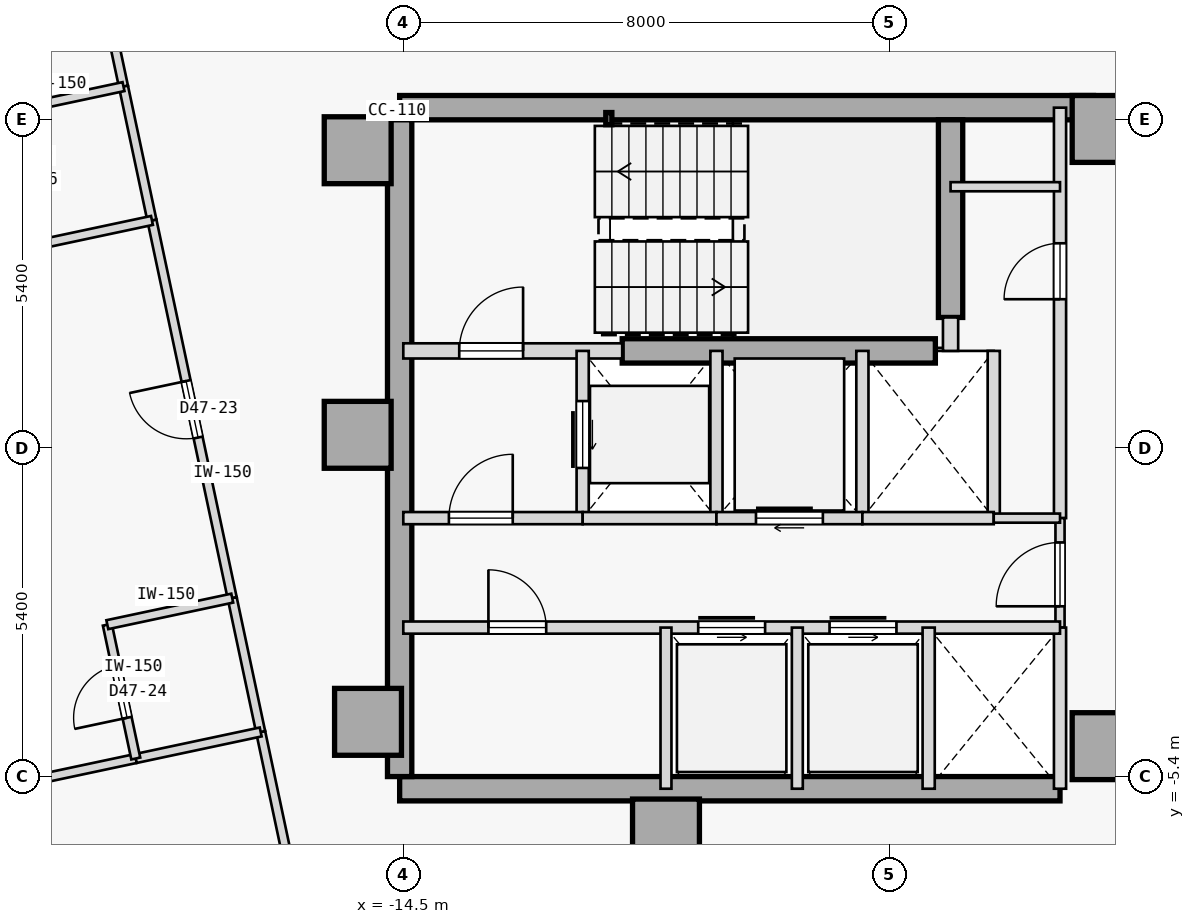
"""IFC4 building model, lengths in metres.
Left out: names, types, materials, properties, quantities, classifications, styles, units other than length and angle.
Written with IfcOpenShell. Run it as: python <this file> out.ifc"""

import sys

from ifc_helpers import new_model, si_unit, direction, frame, frame_2d, origin, origin_2d, place, context, subcontext, project, spatial, rectangle, hollow_rectangle, extrude, element, fill, save


model = new_model("IFC4")
c1 = context("Model", 3, precision=1e-05, world=origin(), true_north=direction((0.0, 1.0)))
c2 = subcontext(c1, "Body", "Model", "MODEL_VIEW")
j1 = project(units=[si_unit("LENGTHUNIT", "METRE"), si_unit("PLANEANGLEUNIT", "RADIAN")], contexts=[c1])
p1 = place(None, origin())
s1 = spatial("IfcSite", under=j1, at=p1, CompositionType="ELEMENT")
p2 = place(p1, origin())
s2 = spatial("IfcBuilding", under=s1, at=p2, CompositionType="ELEMENT")
p3 = place(p2, frame((0.0, 0.0, 182.0)))
s3 = spatial("IfcBuildingStorey", under=s2, at=p3, CompositionType="ELEMENT", Elevation=182.0)
for number, where, z_axis, x_axis in (
    (1, (-15.25, 4.9, 0.0), (0.0, 0.0, 1.0), (1.0, 0.0, 0.0)),
    (2, (-15.25, 0.22, 0.0), (0.0, 0.0, 1.0), (1.0, 0.0, 0.0)),
    (3, (-15.08, -4.5, 0.0), (0.0, 0.0, 1.0), (1.0, 0.0, 0.0)),
    (4, (-10.18, -6.32, 0.0), (0.0, 0.0, 1.0), (1.0, 0.0, 0.0)),
    (5, (-2.95, -4.9, 0.0), (0.0, 0.0, 1.0), (1.0, 0.0, 0.0)),
    (6, (-2.95, 5.25, 0.0), (0.0, 0.0, 1.0), (1.0, 0.0, 0.0)),
):
    element("IfcColumn", number, at=place(p3, frame(where, z_axis=z_axis, x_axis=x_axis)), inside=s3, PredefinedType="COLUMN", context=c2, shape_type="SweptSolid", body=[
        extrude(rectangle(XDim=1.1, YDim=1.1, at=origin_2d()), origin(), (0.0, 0.0, 1.0), 3.4),
    ])
p4 = place(p3, frame((-14.56, 5.6, 0.0), z_axis=(0.0, 0.0, 1.0), x_axis=(1.0, 0.0, 0.0)))
e7 = element("IfcWall", 7, at=p4, inside=s3, PredefinedType="SHEAR", context=c2, shape_type="SweptSolid", body=[
    extrude(rectangle(XDim=11.41, YDim=0.4, at=frame_2d((5.705, 0.0))), origin(), (0.0, 0.0, 1.0), 3.175),
])
p5 = place(p3, frame((-14.56, -5.6, 0.0), z_axis=(0.0, 0.0, 1.0), x_axis=(1.0, 0.0, 0.0)))
e8 = element("IfcWall", 8, at=p5, inside=s3, PredefinedType="SHEAR", context=c2, shape_type="SweptSolid", body=[
    extrude(rectangle(XDim=10.86, YDim=0.4, at=frame_2d((5.43, 0.0))), origin(), (0.0, 0.0, 1.0), 3.175),
])
p6 = place(p3, frame((-14.56, -5.4, 0.0), z_axis=(0.0, 0.0, 1.0), x_axis=(0.0, 1.0, 0.0)))
e9 = element("IfcWall", 9, at=p6, inside=s3, PredefinedType="SHEAR", context=c2, shape_type="SweptSolid", body=[
    extrude(rectangle(XDim=10.8, YDim=0.4, at=frame_2d((5.4, 0.0))), origin(), (0.0, 0.0, 1.0), 3.175),
])
p7 = place(p3, frame((-5.5, 2.15, 0.0), z_axis=(0.0, 0.0, 1.0), x_axis=(0.0, 1.0, 0.0)))
e10 = element("IfcWall", 10, at=p7, inside=s3, PredefinedType="SHEAR", context=c2, shape_type="SweptSolid", body=[
    extrude(rectangle(XDim=3.25, YDim=0.4, at=frame_2d((1.625, 0.0))), origin(), (0.0, 0.0, 1.0), 3.175),
])
p8 = place(p3, frame((-10.9, 1.6, 0.0), z_axis=(0.0, 0.0, 1.0), x_axis=(1.0, 0.0, 0.0)))
e11 = element("IfcWall", 11, at=p8, inside=s3, PredefinedType="SHEAR", context=c2, shape_type="SweptSolid", body=[
    extrude(rectangle(XDim=5.15, YDim=0.4, at=frame_2d((2.575, 0.0))), origin(), (0.0, 0.0, 1.0), 3.175),
])
p9 = place(p3, frame((-11.12, 5.42, 0.0), z_axis=(0.0, 0.0, 1.0), x_axis=(1.0, 0.0, 0.0)))
e12 = element("IfcColumn", 12, at=p9, inside=s3, PredefinedType="COLUMN", context=c2, shape_type="SweptSolid", body=[
    extrude(hollow_rectangle(XDim=0.1, YDim=0.2, WallThickness=0.008, at=origin_2d()), origin(), (0.0, 0.0, 1.0), 3.4),
])
p10 = place(p3, frame((-14.5, 1.6, 0.0), z_axis=(0.0, 0.0, 1.0), x_axis=(1.0, 0.0, 0.0)))
e13 = element("IfcWall", 13, at=p10, inside=s3, PredefinedType="STANDARD", context=c2, shape_type="SweptSolid", body=[
    extrude(rectangle(XDim=3.6, YDim=0.25, at=frame_2d((1.8, 0.0))), origin(), (0.0, 0.0, 1.0), 3.175),
])
p11 = place(p10, frame((0.92, 0.0, 0.0)))
e14 = element("IfcOpeningElement", 14, at=p11, cuts=e13, PredefinedType="OPENING", context=c2, shape_type="SweptSolid", body=[
    extrude(rectangle(XDim=1.05, YDim=2.15, at=frame_2d((0.525, 1.075))), frame((0.0, 0.135, 0.0), z_axis=(0.0, -1.0, 0.0), x_axis=(1.0, 0.0, 0.0)), (0.0, 0.0, 1.0), 0.27),
])
p12 = place(p3, frame((-5.5, 1.6, 0.0), z_axis=(0.0, 0.0, 1.0), x_axis=(0.0, 1.0, 0.0)))
e15 = element("IfcWall", 15, at=p12, inside=s3, PredefinedType="STANDARD", context=c2, shape_type="SweptSolid", body=[
    extrude(rectangle(XDim=0.55, YDim=0.25, at=frame_2d((0.275, 0.0))), origin(), (0.0, 0.0, 1.0), 3.175),
])
p13 = place(p3, frame((-3.7, -1.15, 0.0), z_axis=(0.0, 0.0, 1.0), x_axis=(0.0, 1.0, 0.0)))
e16 = element("IfcWall", 16, at=p13, inside=s3, PredefinedType="STANDARD", context=c2, shape_type="SweptSolid", body=[
    extrude(rectangle(XDim=6.75, YDim=0.2, at=frame_2d((3.375, 0.0))), origin(), (0.0, 0.0, 1.0), 3.175),
])
p14 = place(p13, frame((3.6, 0.0, 0.0)))
e17 = element("IfcOpeningElement", 17, at=p14, cuts=e16, PredefinedType="OPENING", context=c2, shape_type="SweptSolid", body=[
    extrude(rectangle(XDim=0.92, YDim=2.15, at=frame_2d((0.46, 1.075))), frame((0.0, 0.11, 0.0), z_axis=(0.0, -1.0, 0.0), x_axis=(1.0, 0.0, 0.0)), (0.0, 0.0, 1.0), 0.22),
])
p15 = place(p3, frame((-3.7, -2.95, 0.0), z_axis=(0.0, 0.0, 1.0), x_axis=(0.0, 1.0, 0.0)))
e18 = element("IfcWall", 18, at=p15, inside=s3, PredefinedType="PARTITIONING", context=c2, shape_type="SweptSolid", body=[
    extrude(rectangle(XDim=1.8, YDim=0.15, at=frame_2d((0.9, 0.0))), origin(), (0.0, 0.0, 1.0), 3.175),
])
p16 = place(p15, frame((0.35, 0.0, 0.0)))
e19 = element("IfcOpeningElement", 19, at=p16, cuts=e18, PredefinedType="OPENING", context=c2, shape_type="SweptSolid", body=[
    extrude(rectangle(XDim=1.05, YDim=2.18, at=frame_2d((0.525, 1.09))), frame((0.0, 0.085, 0.0), z_axis=(0.0, -1.0, 0.0), x_axis=(1.0, 0.0, 0.0)), (0.0, 0.0, 1.0), 0.17),
])
p17 = place(p3, frame((-3.7, -5.6, 0.0), z_axis=(0.0, 0.0, 1.0), x_axis=(0.0, 1.0, 0.0)))
e20 = element("IfcWall", 20, at=p17, inside=s3, PredefinedType="STANDARD", context=c2, shape_type="SweptSolid", body=[
    extrude(rectangle(XDim=2.65, YDim=0.2, at=frame_2d((1.325, 0.0))), origin(), (0.0, 0.0, 1.0), 3.175),
])
p18 = place(p3, frame((-11.55, -1.15, 0.0), z_axis=(0.0, 0.0, 1.0), x_axis=(0.0, 1.0, 0.0)))
e21 = element("IfcWall", 21, at=p18, inside=s3, PredefinedType="STANDARD", context=c2, shape_type="SweptSolid", body=[
    extrude(rectangle(XDim=2.75, YDim=0.2, at=frame_2d((1.375, 0.0))), origin(), (0.0, 0.0, 1.0), 3.175),
])
p19 = place(p18, frame((0.825, 0.0, 0.0)))
e22 = element("IfcOpeningElement", 22, at=p19, cuts=e21, PredefinedType="OPENING", context=c2, shape_type="SweptSolid", body=[
    extrude(rectangle(XDim=1.1, YDim=2.15, at=frame_2d((0.55, 1.075))), frame((0.0, 0.11, 0.0), z_axis=(0.0, -1.0, 0.0), x_axis=(1.0, 0.0, 0.0)), (0.0, 0.0, 1.0), 0.22),
])
p20 = place(p3, frame((-9.35, -1.15, 0.0), z_axis=(0.0, 0.0, 1.0), x_axis=(0.0, 1.0, 0.0)))
e23 = element("IfcWall", 23, at=p20, inside=s3, PredefinedType="STANDARD", context=c2, shape_type="SweptSolid", body=[
    extrude(rectangle(XDim=2.75, YDim=0.2, at=frame_2d((1.375, 0.0))), origin(), (0.0, 0.0, 1.0), 3.175),
])
p21 = place(p3, frame((-14.5, -1.15, 0.0), z_axis=(0.0, 0.0, 1.0), x_axis=(1.0, 0.0, 0.0)))
e24 = element("IfcWall", 24, at=p21, inside=s3, PredefinedType="STANDARD", context=c2, shape_type="SweptSolid", body=[
    extrude(rectangle(XDim=2.95, YDim=0.2, at=frame_2d((1.475, 0.0))), origin(), (0.0, 0.0, 1.0), 3.175),
])
p22 = place(p21, frame((0.75, 0.0, 0.0)))
e25 = element("IfcOpeningElement", 25, at=p22, cuts=e24, PredefinedType="OPENING", context=c2, shape_type="SweptSolid", body=[
    extrude(rectangle(XDim=1.05, YDim=2.18, at=frame_2d((0.525, 1.09))), frame((0.0, 0.11, 0.0), z_axis=(0.0, -1.0, 0.0), x_axis=(1.0, 0.0, 0.0)), (0.0, 0.0, 1.0), 0.22),
])
p23 = place(p3, frame((-11.55, -1.15, 0.0), z_axis=(0.0, 0.0, 1.0), x_axis=(1.0, 0.0, 0.0)))
e26 = element("IfcWall", 26, at=p23, inside=s3, PredefinedType="STANDARD", context=c2, shape_type="SweptSolid", body=[
    extrude(rectangle(XDim=2.2, YDim=0.2, at=frame_2d((1.1, 0.0))), origin(), (0.0, 0.0, 1.0), 3.175),
])
p24 = place(p3, frame((-6.95, -1.15, 0.0), z_axis=(0.0, 0.0, 1.0), x_axis=(0.0, 1.0, 0.0)))
e27 = element("IfcWall", 27, at=p24, inside=s3, PredefinedType="STANDARD", context=c2, shape_type="SweptSolid", body=[
    extrude(rectangle(XDim=2.75, YDim=0.2, at=frame_2d((1.375, 0.0))), origin(), (0.0, 0.0, 1.0), 3.175),
])
p25 = place(p3, frame((-9.35, -1.15, 0.0), z_axis=(0.0, 0.0, 1.0), x_axis=(1.0, 0.0, 0.0)))
e28 = element("IfcWall", 28, at=p25, inside=s3, PredefinedType="STANDARD", context=c2, shape_type="SweptSolid", body=[
    extrude(rectangle(XDim=2.4, YDim=0.2, at=frame_2d((1.2, 0.0))), origin(), (0.0, 0.0, 1.0), 3.175),
])
p26 = place(p25, frame((0.65, 0.0, 0.0)))
e29 = element("IfcOpeningElement", 29, at=p26, cuts=e28, PredefinedType="OPENING", context=c2, shape_type="SweptSolid", body=[
    extrude(rectangle(XDim=1.1, YDim=2.15, at=frame_2d((0.55, 1.075))), frame((0.0, 0.11, 0.0), z_axis=(0.0, -1.0, 0.0), x_axis=(1.0, 0.0, 0.0)), (0.0, 0.0, 1.0), 0.22),
])
p27 = place(p3, frame((-4.79, -1.15, 0.0), z_axis=(0.0, 0.0, 1.0), x_axis=(0.0, 1.0, 0.0)))
e30 = element("IfcWall", 30, at=p27, inside=s3, PredefinedType="STANDARD", context=c2, shape_type="SweptSolid", body=[
    extrude(rectangle(XDim=2.75, YDim=0.2, at=frame_2d((1.375, 0.0))), origin(), (0.0, 0.0, 1.0), 3.175),
])
p28 = place(p3, frame((-6.95, -1.15, 0.0), z_axis=(0.0, 0.0, 1.0), x_axis=(1.0, 0.0, 0.0)))
e31 = element("IfcWall", 31, at=p28, inside=s3, PredefinedType="STANDARD", context=c2, shape_type="SweptSolid", body=[
    extrude(rectangle(XDim=2.16, YDim=0.2, at=frame_2d((1.08, 0.0))), origin(), (0.0, 0.0, 1.0), 3.175),
])
p29 = place(p3, frame((-4.79, -1.15, 0.0), z_axis=(0.0, 0.0, 1.0), x_axis=(1.0, 0.0, 0.0)))
e32 = element("IfcWall", 32, at=p29, inside=s3, PredefinedType="PARTITIONING", context=c2, shape_type="SweptSolid", body=[
    extrude(rectangle(XDim=1.09, YDim=0.15, at=frame_2d((0.545, 0.0))), origin(), (0.0, 0.0, 1.0), 3.175),
])
p30 = place(p3, frame((-14.5, -2.95, 0.0), z_axis=(0.0, 0.0, 1.0), x_axis=(1.0, 0.0, 0.0)))
e33 = element("IfcWall", 33, at=p30, inside=s3, PredefinedType="STANDARD", context=c2, shape_type="SweptSolid", body=[
    extrude(rectangle(XDim=10.8, YDim=0.2, at=frame_2d((5.4, 0.0))), origin(), (0.0, 0.0, 1.0), 3.175),
])
p31 = place(p30, frame((4.85, 0.0, 0.0)))
e34 = element("IfcOpeningElement", 34, at=p31, cuts=e33, PredefinedType="OPENING", context=c2, shape_type="SweptSolid", body=[
    extrude(rectangle(XDim=1.1, YDim=2.15, at=frame_2d((0.55, 1.075))), frame((0.0, 0.11, 0.0), z_axis=(0.0, -1.0, 0.0), x_axis=(1.0, 0.0, 0.0)), (0.0, 0.0, 1.0), 0.22),
])
p32 = place(p30, frame((7.01, 0.0, 0.0)))
e35 = element("IfcOpeningElement", 35, at=p32, cuts=e33, PredefinedType="OPENING", context=c2, shape_type="SweptSolid", body=[
    extrude(rectangle(XDim=1.1, YDim=2.15, at=frame_2d((0.55, 1.075))), frame((0.0, 0.11, 0.0), z_axis=(0.0, -1.0, 0.0), x_axis=(1.0, 0.0, 0.0)), (0.0, 0.0, 1.0), 0.22),
])
p33 = place(p30, frame((1.4, 0.0, 0.0)))
e36 = element("IfcOpeningElement", 36, at=p33, cuts=e33, PredefinedType="OPENING", context=c2, shape_type="SweptSolid", body=[
    extrude(rectangle(XDim=0.95, YDim=2.15, at=frame_2d((0.475, 1.075))), frame((0.0, 0.11, 0.0), z_axis=(0.0, -1.0, 0.0), x_axis=(1.0, 0.0, 0.0)), (0.0, 0.0, 1.0), 0.22),
])
p34 = place(p3, frame((-5.86, -5.6, 0.0), z_axis=(0.0, 0.0, 1.0), x_axis=(0.0, 1.0, 0.0)))
e37 = element("IfcWall", 37, at=p34, inside=s3, PredefinedType="STANDARD", context=c2, shape_type="SweptSolid", body=[
    extrude(rectangle(XDim=2.65, YDim=0.2, at=frame_2d((1.325, 0.0))), origin(), (0.0, 0.0, 1.0), 3.175),
])
for number, where, z_axis, x_axis in (
    (38, (-10.18, -5.6, 0.0), (0.0, 0.0, 1.0), (0.0, 1.0, 0.0)),
    (39, (-8.02, -5.6, 0.0), (0.0, 0.0, 1.0), (0.0, 1.0, 0.0)),
):
    element("IfcWall", number, at=place(p3, frame(where, z_axis=z_axis, x_axis=x_axis)), inside=s3, PredefinedType="STANDARD", context=c2, shape_type="SweptSolid", body=[
        extrude(rectangle(XDim=2.65, YDim=0.18, at=frame_2d((1.325, 0.0))), origin(), (0.0, 0.0, 1.0), 3.175),
    ])
p35 = place(p3, frame((-5.5, 4.3, 0.0), z_axis=(0.0, 0.0, 1.0), x_axis=(1.0, 0.0, 0.0)))
e40 = element("IfcWall", 40, at=p35, inside=s3, PredefinedType="PARTITIONING", context=c2, shape_type="SweptSolid", body=[
    extrude(rectangle(XDim=1.8, YDim=0.15, at=frame_2d((0.9, 0.0))), origin(), (0.0, 0.0, 1.0), 3.175),
])
p36 = place(p3, frame((-15.525, -10.878, 0.0), z_axis=(0.0, 0.0, 1.0), x_axis=(-0.207887725283, 0.978152694459, 0.0)))
e41 = element("IfcWall", 41, at=p36, inside=s3, PredefinedType="PARTITIONING", context=c2, shape_type="SweptSolid", body=[
    extrude(rectangle(XDim=6.35, YDim=0.15, at=frame_2d((3.175, 0.0))), origin(), (0.0, 0.0, 1.0), 3.175),
])
p37 = place(p36, frame((2.7, 0.0, 0.0)))
e42 = element("IfcOpeningElement", 42, at=p37, cuts=e41, PredefinedType="OPENING", context=c2, shape_type="SweptSolid", body=[
    extrude(rectangle(XDim=0.95, YDim=2.15, at=frame_2d((0.475, 1.075))), frame((0.0, 0.085, 0.0), z_axis=(0.0, -1.0, 0.0), x_axis=(1.0, 0.0, 0.0)), (0.0, 0.0, 1.0), 0.17),
])
p38 = place(p3, frame((-17.313, -2.466, 0.0), z_axis=(0.0, 0.0, 1.0), x_axis=(-0.207916691923, 0.978146537703, 0.0)))
e43 = element("IfcWall", 43, at=p38, inside=s3, PredefinedType="PARTITIONING", context=c2, shape_type="SweptSolid", body=[
    extrude(rectangle(XDim=6.35, YDim=0.15, at=frame_2d((3.175, 0.0))), origin(), (0.0, 0.0, 1.0), 3.175),
])
p39 = place(p38, frame((2.7, 0.0, 0.0)))
e44 = element("IfcOpeningElement", 44, at=p39, cuts=e43, PredefinedType="OPENING", context=c2, shape_type="SweptSolid", body=[
    extrude(rectangle(XDim=0.95, YDim=2.15, at=frame_2d((0.475, 1.075))), frame((0.0, 0.085, 0.0), z_axis=(0.0, -1.0, 0.0), x_axis=(1.0, 0.0, 0.0)), (0.0, 0.0, 1.0), 0.17),
])
p40 = place(p3, frame((-16.845, -4.667, 0.0), z_axis=(0.0, 0.0, 1.0), x_axis=(-0.207913264065, 0.978147266328, 0.0)))
e45 = element("IfcWall", 45, at=p40, inside=s3, PredefinedType="PARTITIONING", context=c2, shape_type="SweptSolid", body=[
    extrude(rectangle(XDim=2.25, YDim=0.15, at=frame_2d((1.125, 0.0))), origin(), (0.0, 0.0, 1.0), 3.175),
])
p41 = place(p3, frame((-19.101, 5.946, 0.0), z_axis=(0.0, 0.0, 1.0), x_axis=(-0.207916691923, 0.978146537703, 0.0)))
e46 = element("IfcWall", 46, at=p41, inside=s3, PredefinedType="PARTITIONING", context=c2, shape_type="SweptSolid", body=[
    extrude(rectangle(XDim=6.35, YDim=0.15, at=frame_2d((3.175, 0.0))), origin(), (0.0, 0.0, 1.0), 3.175),
])
p42 = place(p41, frame((2.7, 0.0, 0.0)))
e47 = element("IfcOpeningElement", 47, at=p42, cuts=e46, PredefinedType="OPENING", context=c2, shape_type="SweptSolid", body=[
    extrude(rectangle(XDim=0.95, YDim=2.15, at=frame_2d((0.475, 1.075))), frame((0.0, 0.085, 0.0), z_axis=(0.0, -1.0, 0.0), x_axis=(1.0, 0.0, 0.0)), (0.0, 0.0, 1.0), 0.17),
])
p43 = place(p3, frame((-18.633, 3.746, 0.0), z_axis=(0.0, 0.0, 1.0), x_axis=(-0.207913264065, 0.978147266328, 0.0)))
e48 = element("IfcWall", 48, at=p43, inside=s3, PredefinedType="PARTITIONING", context=c2, shape_type="SweptSolid", body=[
    extrude(rectangle(XDim=2.25, YDim=0.15, at=frame_2d((1.125, 0.0))), origin(), (0.0, 0.0, 1.0), 3.175),
])
p44 = place(p3, frame((-34.274, -8.371, 0.0), z_axis=(0.0, 0.0, 1.0), x_axis=(0.978146137903, 0.207918572776, 0.0)))
e49 = element("IfcWall", 49, at=p44, inside=s3, PredefinedType="PARTITIONING", context=c2, shape_type="SweptSolid", body=[
    extrude(rectangle(XDim=15.718, YDim=0.15, at=frame_2d((7.859, 0.0))), origin(), (0.0, 0.0, 1.0), 3.175),
])
p45 = place(p3, frame((-18.899, -5.103, 0.0), z_axis=(0.0, 0.0, 1.0), x_axis=(0.97815826, 0.207861536591, 0.0)))
e50 = element("IfcWall", 50, at=p45, inside=s3, PredefinedType="PARTITIONING", context=c2, shape_type="SweptSolid", body=[
    extrude(rectangle(XDim=2.1, YDim=0.15, at=frame_2d((1.05, 0.0))), origin(), (0.0, 0.0, 1.0), 3.175),
])
p46 = place(p3, frame((-18.899, -5.103, 0.0), z_axis=(0.0, 0.0, 1.0), x_axis=(-0.207913264065, 0.978147266328, 0.0)))
e51 = element("IfcWall", 51, at=p46, inside=s3, PredefinedType="PARTITIONING", context=c2, shape_type="SweptSolid", body=[
    extrude(rectangle(XDim=2.25, YDim=0.15, at=frame_2d((1.125, 0.0))), origin(), (0.0, 0.0, 1.0), 3.175),
])
p47 = place(p46, frame((0.685, 0.0, 0.0)))
e52 = element("IfcOpeningElement", 52, at=p47, cuts=e51, PredefinedType="OPENING", context=c2, shape_type="SweptSolid", body=[
    extrude(rectangle(XDim=0.88, YDim=2.15, at=frame_2d((0.44, 1.075))), frame((0.0, 0.085, 0.0), z_axis=(0.0, -1.0, 0.0), x_axis=(1.0, 0.0, 0.0)), (0.0, 0.0, 1.0), 0.17),
])
for number, where, z_axis, x_axis in (
    (53, (-19.367, -2.902, 0.0), (0.0, 0.0, 1.0), (0.978, 0.208, 0.0)),
    (54, (-20.688, 3.309, 0.0), (0.0, 0.0, 1.0), (0.978, 0.208, 0.0)),
    (55, (-21.155, 5.51, 0.0), (0.0, 0.0, 1.0), (0.978, 0.208, 0.0)),
):
    element("IfcWall", number, at=place(p3, frame(where, z_axis=z_axis, x_axis=x_axis)), inside=s3, PredefinedType="PARTITIONING", context=c2, shape_type="SweptSolid", body=[
        extrude(rectangle(XDim=2.1, YDim=0.15, at=frame_2d((1.05, 0.0))), origin(), (0.0, 0.0, 1.0), 3.175),
    ])
p48 = place(p11, origin())
e56 = element("IfcDoor", 56, at=p48, inside=s3, OperationType="SINGLE_SWING_RIGHT", PredefinedType="DOOR", context=c2, shape_type="SweptSolid", body=[
    extrude(rectangle(XDim=1.05, YDim=2.15, at=frame_2d((0.525, 1.075))), frame((0.0, 0.025, 0.0), z_axis=(0.0, -1.0, 0.0), x_axis=(1.0, 0.0, 0.0)), (0.0, 0.0, 1.0), 0.05),
])
fill(e14, e56)
p49 = place(p22, origin())
e57 = element("IfcDoor", 57, at=p49, inside=s3, OperationType="SINGLE_SWING_RIGHT", PredefinedType="DOOR", context=c2, shape_type="SweptSolid", body=[
    extrude(rectangle(XDim=1.05, YDim=2.18, at=frame_2d((0.525, 1.09))), frame((0.0, 0.025, 0.0), z_axis=(0.0, -1.0, 0.0), x_axis=(1.0, 0.0, 0.0)), (0.0, 0.0, 1.0), 0.05),
])
fill(e25, e57)
p50 = place(p16, origin())
e58 = element("IfcDoor", 58, at=p50, inside=s3, OperationType="SINGLE_SWING_LEFT", PredefinedType="DOOR", context=c2, shape_type="SweptSolid", body=[
    extrude(rectangle(XDim=1.05, YDim=2.18, at=frame_2d((0.525, 1.09))), frame((0.0, 0.025, 0.0), z_axis=(0.0, -1.0, 0.0), x_axis=(1.0, 0.0, 0.0)), (0.0, 0.0, 1.0), 0.05),
])
fill(e19, e58)
p51 = place(p19, origin())
e59 = element("IfcDoor", 59, at=p51, inside=s3, OperationType="SLIDING_TO_RIGHT", PredefinedType="DOOR", context=c2, shape_type="SweptSolid", body=[
    extrude(rectangle(XDim=1.1, YDim=2.15, at=frame_2d((0.55, 1.075))), frame((0.0, 0.025, 0.0), z_axis=(0.0, -1.0, 0.0), x_axis=(1.0, 0.0, 0.0)), (0.0, 0.0, 1.0), 0.05),
])
fill(e22, e59)
p52 = place(p26, origin())
e60 = element("IfcDoor", 60, at=p52, inside=s3, OperationType="SLIDING_TO_RIGHT", PredefinedType="DOOR", context=c2, shape_type="SweptSolid", body=[
    extrude(rectangle(XDim=1.1, YDim=2.15, at=frame_2d((0.55, 1.075))), frame((0.0, 0.025, 0.0), z_axis=(0.0, -1.0, 0.0), x_axis=(1.0, 0.0, 0.0)), (0.0, 0.0, 1.0), 0.05),
])
fill(e29, e60)
p53 = place(p31, origin())
e61 = element("IfcDoor", 61, at=p53, inside=s3, OperationType="SLIDING_TO_LEFT", PredefinedType="DOOR", context=c2, shape_type="SweptSolid", body=[
    extrude(rectangle(XDim=1.1, YDim=2.15, at=frame_2d((0.55, 1.075))), frame((0.0, 0.025, 0.0), z_axis=(0.0, -1.0, 0.0), x_axis=(1.0, 0.0, 0.0)), (0.0, 0.0, 1.0), 0.05),
])
fill(e34, e61)
p54 = place(p32, origin())
e62 = element("IfcDoor", 62, at=p54, inside=s3, OperationType="SLIDING_TO_LEFT", PredefinedType="DOOR", context=c2, shape_type="SweptSolid", body=[
    extrude(rectangle(XDim=1.1, YDim=2.15, at=frame_2d((0.55, 1.075))), frame((0.0, 0.025, 0.0), z_axis=(0.0, -1.0, 0.0), x_axis=(1.0, 0.0, 0.0)), (0.0, 0.0, 1.0), 0.05),
])
fill(e35, e62)
p55 = place(p33, origin())
e63 = element("IfcDoor", 63, at=p55, inside=s3, OperationType="SINGLE_SWING_LEFT", PredefinedType="DOOR", context=c2, shape_type="SweptSolid", body=[
    extrude(rectangle(XDim=0.95, YDim=2.15, at=frame_2d((0.475, 1.075))), frame((0.0, 0.025, 0.0), z_axis=(0.0, -1.0, 0.0), x_axis=(1.0, 0.0, 0.0)), (0.0, 0.0, 1.0), 0.05),
])
fill(e36, e63)
p56 = place(p14, origin())
e64 = element("IfcDoor", 64, at=p56, inside=s3, OperationType="SINGLE_SWING_LEFT", PredefinedType="DOOR", context=c2, shape_type="SweptSolid", body=[
    extrude(rectangle(XDim=0.92, YDim=2.15, at=frame_2d((0.46, 1.075))), frame((0.0, 0.025, 0.0), z_axis=(0.0, -1.0, 0.0), x_axis=(1.0, 0.0, 0.0)), (0.0, 0.0, 1.0), 0.05),
])
fill(e17, e64)
p57 = place(p39, origin())
e65 = element("IfcDoor", 65, at=p57, inside=s3, OperationType="SINGLE_SWING_RIGHT", PredefinedType="DOOR", context=c2, shape_type="SweptSolid", body=[
    extrude(rectangle(XDim=0.95, YDim=2.15, at=frame_2d((0.475, 1.075))), frame((0.0, 0.025, 0.0), z_axis=(0.0, -1.0, 0.0), x_axis=(1.0, 0.0, 0.0)), (0.0, 0.0, 1.0), 0.05),
])
fill(e44, e65)
p58 = place(p47, origin())
e66 = element("IfcDoor", 66, at=p58, inside=s3, OperationType="SINGLE_SWING_LEFT", PredefinedType="DOOR", context=c2, shape_type="SweptSolid", body=[
    extrude(rectangle(XDim=0.88, YDim=2.15, at=frame_2d((0.44, 1.075))), frame((0.0, 0.025, 0.0), z_axis=(0.0, -1.0, 0.0), x_axis=(1.0, 0.0, 0.0)), (0.0, 0.0, 1.0), 0.05),
])
fill(e52, e66)
save(model, sys.argv[1])
